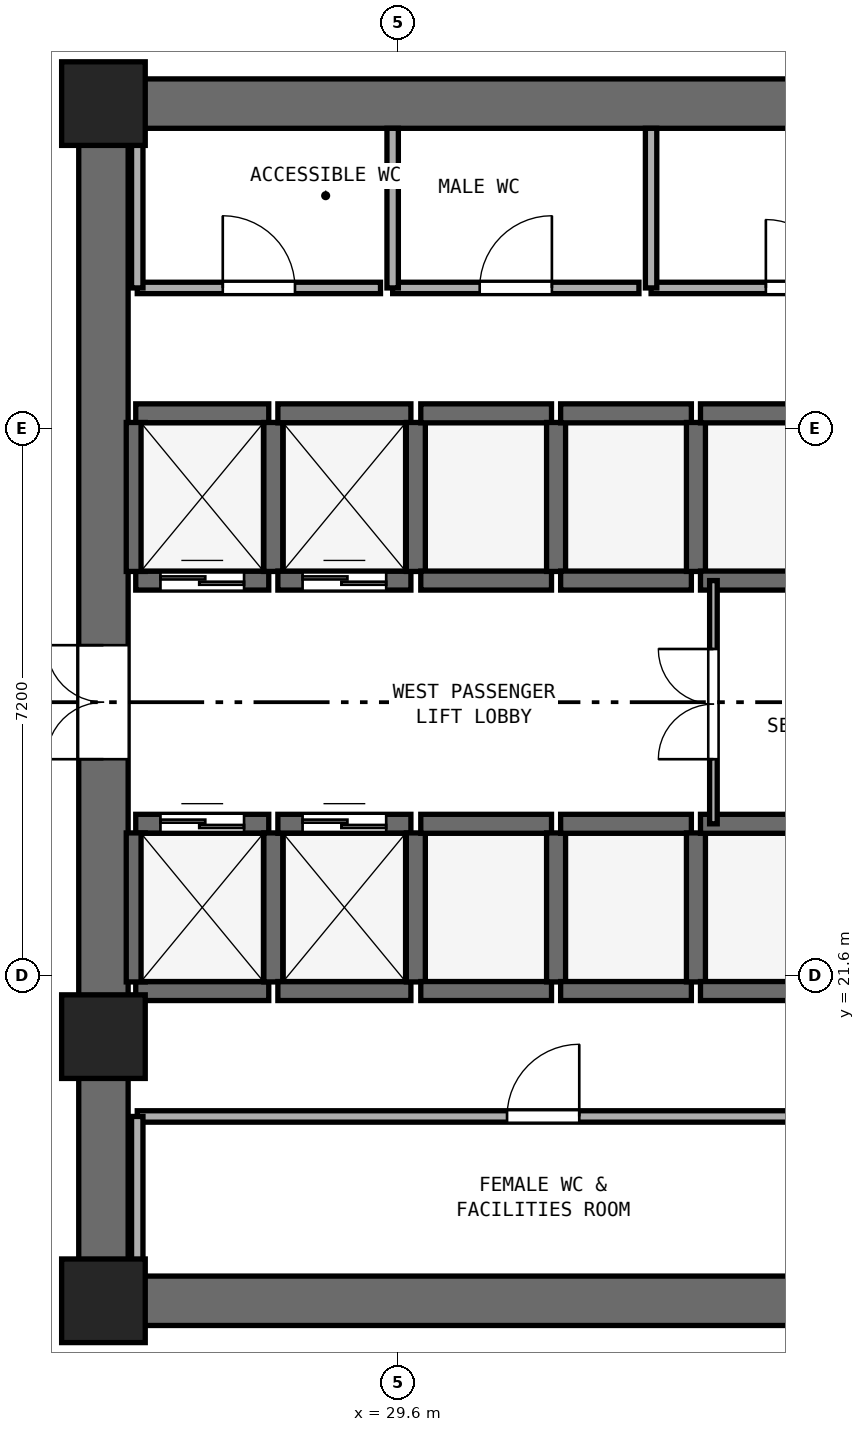
"""IFC4 building model, lengths in metres.
Left out: names, types, materials, properties, quantities, classifications, styles, units other than length and angle.
Written with IfcOpenShell. Run it as: python <this file> out.ifc"""

import sys

from ifc_helpers import new_model, si_unit, direction, frame, frame_2d, origin, origin_2d, place, context, subcontext, project, spatial, rectangle, extrude, element, fill, save


model = new_model("IFC4")
c1 = context("Model", 3, precision=1e-05, world=origin(), true_north=direction((0.0, 1.0)))
c2 = subcontext(c1, "Body", "Model", "MODEL_VIEW")
j1 = project(units=[si_unit("LENGTHUNIT", "METRE"), si_unit("PLANEANGLEUNIT", "RADIAN")], contexts=[c1])
p1 = place(None, origin())
s1 = spatial("IfcSite", under=j1, at=p1, CompositionType="ELEMENT")
p2 = place(p1, origin())
s2 = spatial("IfcBuilding", under=s1, at=p2, CompositionType="ELEMENT")
p3 = place(p2, frame((0.0, 0.0, 59.2)))
s3 = spatial("IfcBuildingStorey", under=s2, at=p3, CompositionType="ELEMENT", Elevation=59.2)
for number, where, z_axis, x_axis in (
    (1, (25.4, 17.325, 0.0), (0.0, 0.0, 1.0), (1.0, 0.0, 0.0)),
    (2, (25.4, 33.075, 0.0), (0.0, 0.0, 1.0), (1.0, 0.0, 0.0)),
):
    element("IfcWall", number, at=place(p3, frame(where, z_axis=z_axis, x_axis=x_axis)), inside=s3, PredefinedType="SHEAR", context=c2, shape_type="SweptSolid", body=[
        extrude(rectangle(XDim=23.2, YDim=0.65, at=frame_2d((11.6, 0.0))), origin(), (0.0, 0.0, 1.0), 3.525),
    ])
p4 = place(p3, frame((25.725, 17.65, 0.0), z_axis=(0.0, 0.0, 1.0), x_axis=(0.0, 1.0, 0.0)))
e3 = element("IfcWall", 3, at=p4, inside=s3, PredefinedType="SHEAR", context=c2, shape_type="SweptSolid", body=[
    extrude(rectangle(XDim=15.1, YDim=0.65, at=frame_2d((7.55, 0.0))), origin(), (0.0, 0.0, 1.0), 3.525),
])
p5 = place(p4, frame((6.8, 0.0, 0.0)))
e4 = element("IfcOpeningElement", 4, at=p5, cuts=e3, PredefinedType="OPENING", context=c2, shape_type="SweptSolid", body=[
    extrude(rectangle(XDim=1.5, YDim=2.15, at=frame_2d((0.75, 1.075))), frame((0.0, 0.335, 0.0), z_axis=(0.0, -1.0, 0.0), x_axis=(1.0, 0.0, 0.0)), (0.0, 0.0, 1.0), 0.67),
])
for number, where, z_axis, x_axis in (
    (5, (25.725, 17.325, 0.0), (0.0, 0.0, 1.0), (1.0, 0.0, 0.0)),
    (6, (25.725, 33.075, 0.0), (0.0, 0.0, 1.0), (1.0, 0.0, 0.0)),
    (7, (25.725, 20.8, 0.0), (0.0, 0.0, 1.0), (1.0, 0.0, 0.0)),
):
    element("IfcColumn", number, at=place(p3, frame(where, z_axis=z_axis, x_axis=x_axis)), inside=s3, PredefinedType="PILASTER", context=c2, shape_type="SweptSolid", body=[
        extrude(rectangle(XDim=1.1, YDim=1.1, at=origin_2d()), origin(), (0.0, 0.0, 1.0), 3.8),
    ])
p6 = place(p3, frame((26.15, 26.8, 0.0), z_axis=(0.0, 0.0, 1.0), x_axis=(1.0, 0.0, 0.0)))
e8 = element("IfcWall", 8, at=p6, inside=s3, PredefinedType="SHEAR", context=c2, shape_type="SweptSolid", body=[
    extrude(rectangle(XDim=1.75, YDim=0.25, at=frame_2d((0.875, 0.0))), origin(), (0.0, 0.0, 1.0), 3.525),
])
p7 = place(p6, frame((0.325, 0.0, 0.0)))
e9 = element("IfcOpeningElement", 9, at=p7, cuts=e8, PredefinedType="OPENING", context=c2, shape_type="SweptSolid", body=[
    extrude(rectangle(XDim=1.1, YDim=2.15, at=frame_2d((0.55, 1.075))), frame((0.0, 0.135, 0.0), z_axis=(0.0, -1.0, 0.0), x_axis=(1.0, 0.0, 0.0)), (0.0, 0.0, 1.0), 0.27),
])
p8 = place(p3, frame((26.15, 29.0, 0.0), z_axis=(0.0, 0.0, 1.0), x_axis=(1.0, 0.0, 0.0)))
e10 = element("IfcWall", 10, at=p8, inside=s3, PredefinedType="SHEAR", context=c2, shape_type="SweptSolid", body=[
    extrude(rectangle(XDim=1.75, YDim=0.25, at=frame_2d((0.875, 0.0))), origin(), (0.0, 0.0, 1.0), 3.525),
])
for number, where, z_axis, x_axis in (
    (11, (26.15, 26.92, 0.0), (0.0, 0.0, 1.0), (0.0, 1.0, 0.0)),
    (12, (27.96, 26.92, 0.0), (0.0, 0.0, 1.0), (0.0, 1.0, 0.0)),
):
    element("IfcWall", number, at=place(p3, frame(where, z_axis=z_axis, x_axis=x_axis)), inside=s3, PredefinedType="SHEAR", context=c2, shape_type="SweptSolid", body=[
        extrude(rectangle(XDim=1.96, YDim=0.25, at=frame_2d((0.98, 0.0))), origin(), (0.0, 0.0, 1.0), 3.525),
    ])
p9 = place(p3, frame((28.02, 26.8, 0.0), z_axis=(0.0, 0.0, 1.0), x_axis=(1.0, 0.0, 0.0)))
e13 = element("IfcWall", 13, at=p9, inside=s3, PredefinedType="SHEAR", context=c2, shape_type="SweptSolid", body=[
    extrude(rectangle(XDim=1.75, YDim=0.25, at=frame_2d((0.875, 0.0))), origin(), (0.0, 0.0, 1.0), 3.525),
])
p10 = place(p9, frame((0.325, 0.0, 0.0)))
e14 = element("IfcOpeningElement", 14, at=p10, cuts=e13, PredefinedType="OPENING", context=c2, shape_type="SweptSolid", body=[
    extrude(rectangle(XDim=1.1, YDim=2.15, at=frame_2d((0.55, 1.075))), frame((0.0, 0.135, 0.0), z_axis=(0.0, -1.0, 0.0), x_axis=(1.0, 0.0, 0.0)), (0.0, 0.0, 1.0), 0.27),
])
p11 = place(p3, frame((28.02, 29.0, 0.0), z_axis=(0.0, 0.0, 1.0), x_axis=(1.0, 0.0, 0.0)))
e15 = element("IfcWall", 15, at=p11, inside=s3, PredefinedType="SHEAR", context=c2, shape_type="SweptSolid", body=[
    extrude(rectangle(XDim=1.75, YDim=0.25, at=frame_2d((0.875, 0.0))), origin(), (0.0, 0.0, 1.0), 3.525),
])
p12 = place(p3, frame((29.835, 26.92, 0.0), z_axis=(0.0, 0.0, 1.0), x_axis=(0.0, 1.0, 0.0)))
e16 = element("IfcWall", 16, at=p12, inside=s3, PredefinedType="SHEAR", context=c2, shape_type="SweptSolid", body=[
    extrude(rectangle(XDim=1.96, YDim=0.25, at=frame_2d((0.98, 0.0))), origin(), (0.0, 0.0, 1.0), 3.525),
])
p13 = place(p3, frame((26.15, 21.4, 0.0), z_axis=(0.0, 0.0, 1.0), x_axis=(1.0, 0.0, 0.0)))
e17 = element("IfcWall", 17, at=p13, inside=s3, PredefinedType="SHEAR", context=c2, shape_type="SweptSolid", body=[
    extrude(rectangle(XDim=1.75, YDim=0.25, at=frame_2d((0.875, 0.0))), origin(), (0.0, 0.0, 1.0), 3.525),
])
p14 = place(p3, frame((26.15, 23.6, 0.0), z_axis=(0.0, 0.0, 1.0), x_axis=(1.0, 0.0, 0.0)))
e18 = element("IfcWall", 18, at=p14, inside=s3, PredefinedType="SHEAR", context=c2, shape_type="SweptSolid", body=[
    extrude(rectangle(XDim=1.75, YDim=0.25, at=frame_2d((0.875, 0.0))), origin(), (0.0, 0.0, 1.0), 3.525),
])
p15 = place(p14, frame((0.325, 0.0, 0.0)))
e19 = element("IfcOpeningElement", 19, at=p15, cuts=e18, PredefinedType="OPENING", context=c2, shape_type="SweptSolid", body=[
    extrude(rectangle(XDim=1.1, YDim=2.15, at=frame_2d((0.55, 1.075))), frame((0.0, 0.135, 0.0), z_axis=(0.0, -1.0, 0.0), x_axis=(1.0, 0.0, 0.0)), (0.0, 0.0, 1.0), 0.27),
])
for number, where, z_axis, x_axis in (
    (20, (26.15, 21.52, 0.0), (0.0, 0.0, 1.0), (0.0, 1.0, 0.0)),
    (21, (27.96, 21.52, 0.0), (0.0, 0.0, 1.0), (0.0, 1.0, 0.0)),
):
    element("IfcWall", number, at=place(p3, frame(where, z_axis=z_axis, x_axis=x_axis)), inside=s3, PredefinedType="SHEAR", context=c2, shape_type="SweptSolid", body=[
        extrude(rectangle(XDim=1.96, YDim=0.25, at=frame_2d((0.98, 0.0))), origin(), (0.0, 0.0, 1.0), 3.525),
    ])
p16 = place(p3, frame((28.02, 21.4, 0.0), z_axis=(0.0, 0.0, 1.0), x_axis=(1.0, 0.0, 0.0)))
e22 = element("IfcWall", 22, at=p16, inside=s3, PredefinedType="SHEAR", context=c2, shape_type="SweptSolid", body=[
    extrude(rectangle(XDim=1.75, YDim=0.25, at=frame_2d((0.875, 0.0))), origin(), (0.0, 0.0, 1.0), 3.525),
])
p17 = place(p3, frame((28.02, 23.6, 0.0), z_axis=(0.0, 0.0, 1.0), x_axis=(1.0, 0.0, 0.0)))
e23 = element("IfcWall", 23, at=p17, inside=s3, PredefinedType="SHEAR", context=c2, shape_type="SweptSolid", body=[
    extrude(rectangle(XDim=1.75, YDim=0.25, at=frame_2d((0.875, 0.0))), origin(), (0.0, 0.0, 1.0), 3.525),
])
p18 = place(p17, frame((0.325, 0.0, 0.0)))
e24 = element("IfcOpeningElement", 24, at=p18, cuts=e23, PredefinedType="OPENING", context=c2, shape_type="SweptSolid", body=[
    extrude(rectangle(XDim=1.1, YDim=2.15, at=frame_2d((0.55, 1.075))), frame((0.0, 0.135, 0.0), z_axis=(0.0, -1.0, 0.0), x_axis=(1.0, 0.0, 0.0)), (0.0, 0.0, 1.0), 0.27),
])
p19 = place(p3, frame((29.835, 21.52, 0.0), z_axis=(0.0, 0.0, 1.0), x_axis=(0.0, 1.0, 0.0)))
e25 = element("IfcWall", 25, at=p19, inside=s3, PredefinedType="SHEAR", context=c2, shape_type="SweptSolid", body=[
    extrude(rectangle(XDim=1.96, YDim=0.25, at=frame_2d((0.98, 0.0))), origin(), (0.0, 0.0, 1.0), 3.525),
])
for number, where, z_axis, x_axis in (
    (26, (29.9, 21.4, 0.0), (0.0, 0.0, 1.0), (1.0, 0.0, 0.0)),
    (27, (29.9, 23.6, 0.0), (0.0, 0.0, 1.0), (1.0, 0.0, 0.0)),
):
    element("IfcWall", number, at=place(p3, frame(where, z_axis=z_axis, x_axis=x_axis)), inside=s3, PredefinedType="SHEAR", context=c2, shape_type="SweptSolid", body=[
        extrude(rectangle(XDim=1.72, YDim=0.25, at=frame_2d((0.86, 0.0))), origin(), (0.0, 0.0, 1.0), 3.525),
    ])
p20 = place(p3, frame((31.68, 21.52, 0.0), z_axis=(0.0, 0.0, 1.0), x_axis=(0.0, 1.0, 0.0)))
e28 = element("IfcWall", 28, at=p20, inside=s3, PredefinedType="SHEAR", context=c2, shape_type="SweptSolid", body=[
    extrude(rectangle(XDim=1.96, YDim=0.25, at=frame_2d((0.98, 0.0))), origin(), (0.0, 0.0, 1.0), 3.525),
])
for number, where, z_axis, x_axis in (
    (29, (31.74, 21.4, 0.0), (0.0, 0.0, 1.0), (1.0, 0.0, 0.0)),
    (30, (31.74, 23.6, 0.0), (0.0, 0.0, 1.0), (1.0, 0.0, 0.0)),
):
    element("IfcWall", number, at=place(p3, frame(where, z_axis=z_axis, x_axis=x_axis)), inside=s3, PredefinedType="SHEAR", context=c2, shape_type="SweptSolid", body=[
        extrude(rectangle(XDim=1.72, YDim=0.25, at=frame_2d((0.86, 0.0))), origin(), (0.0, 0.0, 1.0), 3.525),
    ])
p21 = place(p3, frame((33.52, 21.52, 0.0), z_axis=(0.0, 0.0, 1.0), x_axis=(0.0, 1.0, 0.0)))
e31 = element("IfcWall", 31, at=p21, inside=s3, PredefinedType="SHEAR", context=c2, shape_type="SweptSolid", body=[
    extrude(rectangle(XDim=1.96, YDim=0.25, at=frame_2d((0.98, 0.0))), origin(), (0.0, 0.0, 1.0), 3.525),
])
for number, where, z_axis, x_axis in (
    (32, (33.58, 21.4, 0.0), (0.0, 0.0, 1.0), (1.0, 0.0, 0.0)),
    (33, (33.58, 23.6, 0.0), (0.0, 0.0, 1.0), (1.0, 0.0, 0.0)),
):
    element("IfcWall", number, at=place(p3, frame(where, z_axis=z_axis, x_axis=x_axis)), inside=s3, PredefinedType="SHEAR", context=c2, shape_type="SweptSolid", body=[
        extrude(rectangle(XDim=1.72, YDim=0.25, at=frame_2d((0.86, 0.0))), origin(), (0.0, 0.0, 1.0), 3.525),
    ])
for number, where, z_axis, x_axis in (
    (34, (29.9, 26.8, 0.0), (0.0, 0.0, 1.0), (1.0, 0.0, 0.0)),
    (35, (29.9, 29.0, 0.0), (0.0, 0.0, 1.0), (1.0, 0.0, 0.0)),
):
    element("IfcWall", number, at=place(p3, frame(where, z_axis=z_axis, x_axis=x_axis)), inside=s3, PredefinedType="SHEAR", context=c2, shape_type="SweptSolid", body=[
        extrude(rectangle(XDim=1.72, YDim=0.25, at=frame_2d((0.86, 0.0))), origin(), (0.0, 0.0, 1.0), 3.525),
    ])
p22 = place(p3, frame((31.68, 26.92, 0.0), z_axis=(0.0, 0.0, 1.0), x_axis=(0.0, 1.0, 0.0)))
e36 = element("IfcWall", 36, at=p22, inside=s3, PredefinedType="SHEAR", context=c2, shape_type="SweptSolid", body=[
    extrude(rectangle(XDim=1.96, YDim=0.25, at=frame_2d((0.98, 0.0))), origin(), (0.0, 0.0, 1.0), 3.525),
])
for number, where, z_axis, x_axis in (
    (37, (31.74, 26.8, 0.0), (0.0, 0.0, 1.0), (1.0, 0.0, 0.0)),
    (38, (31.74, 29.0, 0.0), (0.0, 0.0, 1.0), (1.0, 0.0, 0.0)),
):
    element("IfcWall", number, at=place(p3, frame(where, z_axis=z_axis, x_axis=x_axis)), inside=s3, PredefinedType="SHEAR", context=c2, shape_type="SweptSolid", body=[
        extrude(rectangle(XDim=1.72, YDim=0.25, at=frame_2d((0.86, 0.0))), origin(), (0.0, 0.0, 1.0), 3.525),
    ])
p23 = place(p3, frame((33.52, 26.92, 0.0), z_axis=(0.0, 0.0, 1.0), x_axis=(0.0, 1.0, 0.0)))
e39 = element("IfcWall", 39, at=p23, inside=s3, PredefinedType="SHEAR", context=c2, shape_type="SweptSolid", body=[
    extrude(rectangle(XDim=1.96, YDim=0.25, at=frame_2d((0.98, 0.0))), origin(), (0.0, 0.0, 1.0), 3.525),
])
for number, where, z_axis, x_axis in (
    (40, (33.58, 26.8, 0.0), (0.0, 0.0, 1.0), (1.0, 0.0, 0.0)),
    (41, (33.58, 29.0, 0.0), (0.0, 0.0, 1.0), (1.0, 0.0, 0.0)),
):
    element("IfcWall", number, at=place(p3, frame(where, z_axis=z_axis, x_axis=x_axis)), inside=s3, PredefinedType="SHEAR", context=c2, shape_type="SweptSolid", body=[
        extrude(rectangle(XDim=1.72, YDim=0.25, at=frame_2d((0.86, 0.0))), origin(), (0.0, 0.0, 1.0), 3.525),
    ])
p24 = place(p3, frame((26.17, 30.65, 0.0), z_axis=(0.0, 0.0, 1.0), x_axis=(1.0, 0.0, 0.0)))
e42 = element("IfcWall", 42, at=p24, inside=s3, PredefinedType="PARTITIONING", context=c2, shape_type="SweptSolid", body=[
    extrude(rectangle(XDim=3.2, YDim=0.15, at=frame_2d((1.6, 0.0))), origin(), (0.0, 0.0, 1.0), 3.525),
])
p25 = place(p24, frame((1.125, 0.0, 0.0)))
e43 = element("IfcOpeningElement", 43, at=p25, cuts=e42, PredefinedType="OPENING", context=c2, shape_type="SweptSolid", body=[
    extrude(rectangle(XDim=0.95, YDim=2.1, at=frame_2d((0.475, 1.05))), frame((0.0, 0.085, 0.0), z_axis=(0.0, -1.0, 0.0), x_axis=(1.0, 0.0, 0.0)), (0.0, 0.0, 1.0), 0.17),
])
p26 = place(p3, frame((26.17, 30.65, 0.0), z_axis=(0.0, 0.0, 1.0), x_axis=(0.0, 1.0, 0.0)))
e44 = element("IfcWall", 44, at=p26, inside=s3, PredefinedType="PARTITIONING", context=c2, shape_type="SweptSolid", body=[
    extrude(rectangle(XDim=2.1, YDim=0.15, at=frame_2d((1.05, 0.0))), origin(), (0.0, 0.0, 1.0), 3.525),
])
p27 = place(p3, frame((29.53, 30.65, 0.0), z_axis=(0.0, 0.0, 1.0), x_axis=(1.0, 0.0, 0.0)))
e45 = element("IfcWall", 45, at=p27, inside=s3, PredefinedType="PARTITIONING", context=c2, shape_type="SweptSolid", body=[
    extrude(rectangle(XDim=3.24, YDim=0.15, at=frame_2d((1.62, 0.0))), origin(), (0.0, 0.0, 1.0), 3.525),
])
p28 = place(p27, frame((1.145, 0.0, 0.0)))
e46 = element("IfcOpeningElement", 46, at=p28, cuts=e45, PredefinedType="OPENING", context=c2, shape_type="SweptSolid", body=[
    extrude(rectangle(XDim=0.95, YDim=2.1, at=frame_2d((0.475, 1.05))), frame((0.0, 0.085, 0.0), z_axis=(0.0, -1.0, 0.0), x_axis=(1.0, 0.0, 0.0)), (0.0, 0.0, 1.0), 0.17),
])
p29 = place(p3, frame((29.53, 30.65, 0.0), z_axis=(0.0, 0.0, 1.0), x_axis=(0.0, 1.0, 0.0)))
e47 = element("IfcWall", 47, at=p29, inside=s3, PredefinedType="PARTITIONING", context=c2, shape_type="SweptSolid", body=[
    extrude(rectangle(XDim=2.1, YDim=0.15, at=frame_2d((1.05, 0.0))), origin(), (0.0, 0.0, 1.0), 3.525),
])
p30 = place(p3, frame((32.93, 30.65, 0.0), z_axis=(0.0, 0.0, 1.0), x_axis=(1.0, 0.0, 0.0)))
e48 = element("IfcWall", 48, at=p30, inside=s3, PredefinedType="PARTITIONING", context=c2, shape_type="SweptSolid", body=[
    extrude(rectangle(XDim=3.92, YDim=0.15, at=frame_2d((1.96, 0.0))), origin(), (0.0, 0.0, 1.0), 3.525),
])
p31 = place(p30, frame((1.51, 0.0, 0.0)))
e49 = element("IfcOpeningElement", 49, at=p31, cuts=e48, PredefinedType="OPENING", context=c2, shape_type="SweptSolid", body=[
    extrude(rectangle(XDim=0.9, YDim=2.1, at=frame_2d((0.45, 1.05))), frame((0.0, 0.085, 0.0), z_axis=(0.0, -1.0, 0.0), x_axis=(1.0, 0.0, 0.0)), (0.0, 0.0, 1.0), 0.17),
])
p32 = place(p3, frame((32.93, 30.65, 0.0), z_axis=(0.0, 0.0, 1.0), x_axis=(0.0, 1.0, 0.0)))
e50 = element("IfcWall", 50, at=p32, inside=s3, PredefinedType="PARTITIONING", context=c2, shape_type="SweptSolid", body=[
    extrude(rectangle(XDim=2.1, YDim=0.15, at=frame_2d((1.05, 0.0))), origin(), (0.0, 0.0, 1.0), 3.525),
])
p33 = place(p3, frame((26.17, 19.75, 0.0), z_axis=(0.0, 0.0, 1.0), x_axis=(1.0, 0.0, 0.0)))
e51 = element("IfcWall", 51, at=p33, inside=s3, PredefinedType="PARTITIONING", context=c2, shape_type="SweptSolid", body=[
    extrude(rectangle(XDim=10.68, YDim=0.15, at=frame_2d((5.34, 0.0))), origin(), (0.0, 0.0, 1.0), 3.525),
])
p34 = place(p33, frame((4.865, 0.0, 0.0)))
e52 = element("IfcOpeningElement", 52, at=p34, cuts=e51, PredefinedType="OPENING", context=c2, shape_type="SweptSolid", body=[
    extrude(rectangle(XDim=0.95, YDim=2.1, at=frame_2d((0.475, 1.05))), frame((0.0, 0.085, 0.0), z_axis=(0.0, -1.0, 0.0), x_axis=(1.0, 0.0, 0.0)), (0.0, 0.0, 1.0), 0.17),
])
p35 = place(p3, frame((26.17, 17.65, 0.0), z_axis=(0.0, 0.0, 1.0), x_axis=(0.0, 1.0, 0.0)))
e53 = element("IfcWall", 53, at=p35, inside=s3, PredefinedType="PARTITIONING", context=c2, shape_type="SweptSolid", body=[
    extrude(rectangle(XDim=2.1, YDim=0.15, at=frame_2d((1.05, 0.0))), origin(), (0.0, 0.0, 1.0), 3.525),
])
p36 = place(p3, frame((33.75, 23.6, 0.0), z_axis=(0.0, 0.0, 1.0), x_axis=(0.0, 1.0, 0.0)))
e54 = element("IfcWall", 54, at=p36, inside=s3, PredefinedType="PARTITIONING", context=c2, shape_type="SweptSolid", body=[
    extrude(rectangle(XDim=3.2, YDim=0.1, at=frame_2d((1.6, 0.0))), origin(), (0.0, 0.0, 1.0), 3.525),
])
p37 = place(p36, frame((0.85, 0.0, 0.0)))
e55 = element("IfcOpeningElement", 55, at=p37, cuts=e54, PredefinedType="OPENING", context=c2, shape_type="SweptSolid", body=[
    extrude(rectangle(XDim=1.45, YDim=2.12, at=frame_2d((0.725, 1.06))), frame((0.0, 0.06, 0.0), z_axis=(0.0, -1.0, 0.0), x_axis=(1.0, 0.0, 0.0)), (0.0, 0.0, 1.0), 0.12),
])
p38 = place(p7, origin())
e56 = element("IfcDoor", 56, at=p38, inside=s3, OperationType="DOUBLE_DOOR_SLIDING", PredefinedType="DOOR", context=c2, shape_type="SweptSolid", body=[
    extrude(rectangle(XDim=1.1, YDim=2.15, at=frame_2d((0.55, 1.075))), frame((0.0, 0.025, 0.0), z_axis=(0.0, -1.0, 0.0), x_axis=(1.0, 0.0, 0.0)), (0.0, 0.0, 1.0), 0.05),
])
fill(e9, e56)
p39 = place(p10, origin())
e57 = element("IfcDoor", 57, at=p39, inside=s3, OperationType="DOUBLE_DOOR_SLIDING", PredefinedType="DOOR", context=c2, shape_type="SweptSolid", body=[
    extrude(rectangle(XDim=1.1, YDim=2.15, at=frame_2d((0.55, 1.075))), frame((0.0, 0.025, 0.0), z_axis=(0.0, -1.0, 0.0), x_axis=(1.0, 0.0, 0.0)), (0.0, 0.0, 1.0), 0.05),
])
fill(e14, e57)
p40 = place(p15, origin())
e58 = element("IfcDoor", 58, at=p40, inside=s3, OperationType="DOUBLE_DOOR_SLIDING", PredefinedType="DOOR", context=c2, shape_type="SweptSolid", body=[
    extrude(rectangle(XDim=1.1, YDim=2.15, at=frame_2d((0.55, 1.075))), frame((0.0, 0.025, 0.0), z_axis=(0.0, -1.0, 0.0), x_axis=(1.0, 0.0, 0.0)), (0.0, 0.0, 1.0), 0.05),
])
fill(e19, e58)
p41 = place(p18, origin())
e59 = element("IfcDoor", 59, at=p41, inside=s3, OperationType="DOUBLE_DOOR_SLIDING", PredefinedType="DOOR", context=c2, shape_type="SweptSolid", body=[
    extrude(rectangle(XDim=1.1, YDim=2.15, at=frame_2d((0.55, 1.075))), frame((0.0, 0.025, 0.0), z_axis=(0.0, -1.0, 0.0), x_axis=(1.0, 0.0, 0.0)), (0.0, 0.0, 1.0), 0.05),
])
fill(e24, e59)
p42 = place(p5, origin())
e60 = element("IfcDoor", 60, at=p42, inside=s3, OperationType="DOUBLE_DOOR_SINGLE_SWING", PredefinedType="DOOR", context=c2, shape_type="SweptSolid", body=[
    extrude(rectangle(XDim=1.5, YDim=2.15, at=frame_2d((0.75, 1.075))), frame((0.0, 0.025, 0.0), z_axis=(0.0, -1.0, 0.0), x_axis=(1.0, 0.0, 0.0)), (0.0, 0.0, 1.0), 0.05),
])
fill(e4, e60)
p43 = place(p25, origin())
e61 = element("IfcDoor", 61, at=p43, inside=s3, OperationType="SINGLE_SWING_LEFT", PredefinedType="DOOR", context=c2, shape_type="SweptSolid", body=[
    extrude(rectangle(XDim=0.95, YDim=2.1, at=frame_2d((0.475, 1.05))), frame((0.0, 0.025, 0.0), z_axis=(0.0, -1.0, 0.0), x_axis=(1.0, 0.0, 0.0)), (0.0, 0.0, 1.0), 0.05),
])
fill(e43, e61)
p44 = place(p28, origin())
e62 = element("IfcDoor", 62, at=p44, inside=s3, OperationType="SINGLE_SWING_RIGHT", PredefinedType="DOOR", context=c2, shape_type="SweptSolid", body=[
    extrude(rectangle(XDim=0.95, YDim=2.1, at=frame_2d((0.475, 1.05))), frame((0.0, 0.025, 0.0), z_axis=(0.0, -1.0, 0.0), x_axis=(1.0, 0.0, 0.0)), (0.0, 0.0, 1.0), 0.05),
])
fill(e46, e62)
p45 = place(p31, origin())
e63 = element("IfcDoor", 63, at=p45, inside=s3, OperationType="SINGLE_SWING_LEFT", PredefinedType="DOOR", context=c2, shape_type="SweptSolid", body=[
    extrude(rectangle(XDim=0.9, YDim=2.1, at=frame_2d((0.45, 1.05))), frame((0.0, 0.025, 0.0), z_axis=(0.0, -1.0, 0.0), x_axis=(1.0, 0.0, 0.0)), (0.0, 0.0, 1.0), 0.05),
])
fill(e49, e63)
p46 = place(p34, origin())
e64 = element("IfcDoor", 64, at=p46, inside=s3, OperationType="SINGLE_SWING_RIGHT", PredefinedType="DOOR", context=c2, shape_type="SweptSolid", body=[
    extrude(rectangle(XDim=0.95, YDim=2.1, at=frame_2d((0.475, 1.05))), frame((0.0, 0.025, 0.0), z_axis=(0.0, -1.0, 0.0), x_axis=(1.0, 0.0, 0.0)), (0.0, 0.0, 1.0), 0.05),
])
fill(e52, e64)
p47 = place(p37, origin())
e65 = element("IfcDoor", 65, at=p47, inside=s3, OperationType="DOUBLE_DOOR_SINGLE_SWING", PredefinedType="DOOR", context=c2, shape_type="SweptSolid", body=[
    extrude(rectangle(XDim=1.45, YDim=2.12, at=frame_2d((0.725, 1.06))), frame((0.0, 0.025, 0.0), z_axis=(0.0, -1.0, 0.0), x_axis=(1.0, 0.0, 0.0)), (0.0, 0.0, 1.0), 0.05),
])
fill(e55, e65)
save(model, sys.argv[1])
